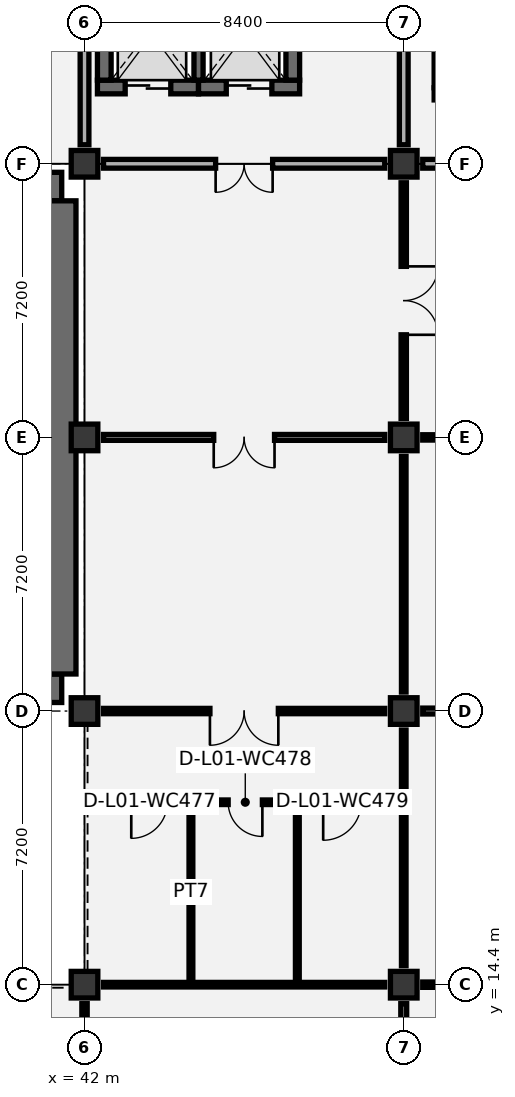
"""IFC4 building model, lengths in metres.
Left out: names, types, materials, properties, quantities, classifications, styles, units other than length and angle.
Written with IfcOpenShell. Run it as: python <this file> out.ifc"""

import sys

from ifc_helpers import new_model, si_unit, direction, frame, frame_2d, origin, origin_2d, place, context, subcontext, project, spatial, rectangle, extrude, element, fill, save


model = new_model("IFC4")
c1 = context("Model", 3, precision=1e-05, world=origin(), true_north=direction((0.0, 1.0)))
c2 = subcontext(c1, "Body", "Model", "MODEL_VIEW")
j1 = project(units=[si_unit("LENGTHUNIT", "METRE"), si_unit("PLANEANGLEUNIT", "RADIAN")], contexts=[c1])
p1 = place(None, origin())
s1 = spatial("IfcSite", under=j1, at=p1, CompositionType="ELEMENT")
p2 = place(p1, origin())
s2 = spatial("IfcBuilding", under=s1, at=p2, CompositionType="ELEMENT")
p3 = place(p2, frame((0.0, 0.0, 6.0)))
s3 = spatial("IfcBuildingStorey", under=s2, at=p3, CompositionType="ELEMENT", Elevation=6.0)
for number, where, z_axis, x_axis in (
    (1, (42.0, 14.4, 0.0), (0.0, 0.0, 1.0), (1.0, 0.0, 0.0)),
    (2, (42.0, 21.6, 0.0), (0.0, 0.0, 1.0), (1.0, 0.0, 0.0)),
    (3, (42.0, 28.8, 0.0), (0.0, 0.0, 1.0), (1.0, 0.0, 0.0)),
    (4, (42.0, 36.0, 0.0), (0.0, 0.0, 1.0), (1.0, 0.0, 0.0)),
    (5, (50.4, 14.4, 0.0), (0.0, 0.0, 1.0), (1.0, 0.0, 0.0)),
    (6, (50.4, 21.6, 0.0), (0.0, 0.0, 1.0), (1.0, 0.0, 0.0)),
    (7, (50.4, 28.8, 0.0), (0.0, 0.0, 1.0), (1.0, 0.0, 0.0)),
    (8, (50.4, 36.0, 0.0), (0.0, 0.0, 1.0), (1.0, 0.0, 0.0)),
):
    element("IfcColumn", number, at=place(p3, frame(where, z_axis=z_axis, x_axis=x_axis)), inside=s3, PredefinedType="COLUMN", context=c2, shape_type="SweptSolid", body=[
        extrude(rectangle(XDim=0.7, YDim=0.7, at=origin_2d()), origin(), (0.0, 0.0, 1.0), 5.4),
    ])
for number, where, z_axis, x_axis in (
    (9, (17.4, 22.2, 0.0), (0.0, 0.0, 1.0), (1.0, 0.0, 0.0)),
    (10, (17.4, 35.4, 0.0), (0.0, 0.0, 1.0), (1.0, 0.0, 0.0)),
):
    element("IfcWall", number, at=place(p3, frame(where, z_axis=z_axis, x_axis=x_axis)), inside=s3, PredefinedType="SOLIDWALL", context=c2, shape_type="SweptSolid", body=[
        extrude(rectangle(XDim=24.0, YDim=0.75, at=frame_2d((12.0, 0.0))), origin(), (0.0, 0.0, 1.0), 3.6),
    ])
p4 = place(p3, frame((41.4, 22.575, 0.0), z_axis=(0.0, 0.0, 1.0), x_axis=(0.0, 1.0, 0.0)))
e11 = element("IfcWall", 11, at=p4, inside=s3, PredefinedType="SOLIDWALL", context=c2, shape_type="SweptSolid", body=[
    extrude(rectangle(XDim=12.45, YDim=0.75, at=frame_2d((6.225, 0.0))), origin(), (0.0, 0.0, 1.0), 3.6),
])
p5 = place(p3, frame((51.2, 37.84, 0.0), z_axis=(0.0, 0.0, 1.0), x_axis=(1.0, 0.0, 0.0)))
e12 = element("IfcWall", 12, at=p5, inside=s3, PredefinedType="SHEAR", context=c2, shape_type="SweptSolid", body=[
    extrude(rectangle(XDim=7.48, YDim=0.32, at=frame_2d((3.74, 0.0))), origin(), (0.0, 0.0, 1.0), 5.075),
])
p6 = place(p5, frame((0.45, 0.0, 0.0)))
e13 = element("IfcOpeningElement", 13, at=p6, cuts=e12, PredefinedType="OPENING", context=c2, shape_type="SweptSolid", body=[
    extrude(rectangle(XDim=1.05, YDim=2.15, at=frame_2d((0.525, 1.075))), frame((0.0, 0.17, 0.0), z_axis=(0.0, -1.0, 0.0), x_axis=(1.0, 0.0, 0.0)), (0.0, 0.0, 1.0), 0.34),
])
p7 = place(p3, frame((51.36, 38.0, 0.0), z_axis=(0.0, 0.0, 1.0), x_axis=(0.0, 1.0, 0.0)))
e14 = element("IfcWall", 14, at=p7, inside=s3, PredefinedType="SHEAR", context=c2, shape_type="SweptSolid", body=[
    extrude(rectangle(XDim=3.8, YDim=0.32, at=frame_2d((1.9, 0.0))), origin(), (0.0, 0.0, 1.0), 5.075),
])
p8 = place(p3, frame((42.34, 38.02, 0.0), z_axis=(0.0, 0.0, 1.0), x_axis=(1.0, 0.0, 0.0)))
e15 = element("IfcWall", 15, at=p8, inside=s3, PredefinedType="SHEAR", context=c2, shape_type="SweptSolid", body=[
    extrude(rectangle(XDim=2.66, YDim=0.36, at=frame_2d((1.33, 0.0))), origin(), (0.0, 0.0, 1.0), 5.075),
])
p9 = place(p8, frame((0.73, 0.0, 0.0)))
e16 = element("IfcOpeningElement", 16, at=p9, cuts=e15, PredefinedType="OPENING", context=c2, shape_type="SweptSolid", body=[
    extrude(rectangle(XDim=1.2, YDim=2.15, at=frame_2d((0.6, 1.075))), frame((0.0, 0.19, 0.0), z_axis=(0.0, -1.0, 0.0), x_axis=(1.0, 0.0, 0.0)), (0.0, 0.0, 1.0), 0.38),
])
p10 = place(p3, frame((45.0, 38.02, 0.0), z_axis=(0.0, 0.0, 1.0), x_axis=(1.0, 0.0, 0.0)))
e17 = element("IfcWall", 17, at=p10, inside=s3, PredefinedType="SHEAR", context=c2, shape_type="SweptSolid", body=[
    extrude(rectangle(XDim=2.66, YDim=0.36, at=frame_2d((1.33, 0.0))), origin(), (0.0, 0.0, 1.0), 5.075),
])
p11 = place(p10, frame((0.73, 0.0, 0.0)))
e18 = element("IfcOpeningElement", 18, at=p11, cuts=e17, PredefinedType="OPENING", context=c2, shape_type="SweptSolid", body=[
    extrude(rectangle(XDim=1.2, YDim=2.15, at=frame_2d((0.6, 1.075))), frame((0.0, 0.19, 0.0), z_axis=(0.0, -1.0, 0.0), x_axis=(1.0, 0.0, 0.0)), (0.0, 0.0, 1.0), 0.38),
])
for number, where, z_axis, x_axis in (
    (19, (42.52, 38.2, 0.0), (0.0, 0.0, 1.0), (0.0, 1.0, 0.0)),
    (20, (47.48, 38.2, 0.0), (0.0, 0.0, 1.0), (0.0, 1.0, 0.0)),
):
    element("IfcWall", number, at=place(p3, frame(where, z_axis=z_axis, x_axis=x_axis)), inside=s3, PredefinedType="SHEAR", context=c2, shape_type="SweptSolid", body=[
        extrude(rectangle(XDim=2.8, YDim=0.36, at=frame_2d((1.4, 0.0))), origin(), (0.0, 0.0, 1.0), 5.075),
    ])
p12 = place(p3, frame((45.0, 38.2, 0.0), z_axis=(0.0, 0.0, 1.0), x_axis=(0.0, 1.0, 0.0)))
e21 = element("IfcWall", 21, at=p12, inside=s3, PredefinedType="SHEAR", context=c2, shape_type="SweptSolid", body=[
    extrude(rectangle(XDim=2.8, YDim=0.24, at=frame_2d((1.4, 0.0))), origin(), (0.0, 0.0, 1.0), 5.075),
])
p13 = place(p3, frame((42.15, 19.2, 0.0), z_axis=(0.0, 0.0, 1.0), x_axis=(1.0, 0.0, 0.0)))
e22 = element("IfcWall", 22, at=p13, inside=s3, PredefinedType="PARTITIONING", context=c2, shape_type="SweptSolid", body=[
    extrude(rectangle(XDim=8.1, YDim=0.12, at=frame_2d((4.05, 0.0))), origin(), (0.0, 0.0, 1.0), 5.075),
])
p14 = place(p13, frame((1.08, 0.0, 0.0)))
e23 = element("IfcOpeningElement", 23, at=p14, cuts=e22, PredefinedType="OPENING", context=c2, shape_type="SweptSolid", body=[
    extrude(rectangle(XDim=0.95, YDim=2.1, at=frame_2d((0.475, 1.05))), frame((0.0, 0.07, 0.0), z_axis=(0.0, -1.0, 0.0), x_axis=(1.0, 0.0, 0.0)), (0.0, 0.0, 1.0), 0.14),
])
p15 = place(p13, frame((3.63, 0.0, 0.0)))
e24 = element("IfcOpeningElement", 24, at=p15, cuts=e22, PredefinedType="OPENING", context=c2, shape_type="SweptSolid", body=[
    extrude(rectangle(XDim=0.9, YDim=2.1, at=frame_2d((0.45, 1.05))), frame((0.0, 0.07, 0.0), z_axis=(0.0, -1.0, 0.0), x_axis=(1.0, 0.0, 0.0)), (0.0, 0.0, 1.0), 0.14),
])
p16 = place(p13, frame((6.13, 0.0, 0.0)))
e25 = element("IfcOpeningElement", 25, at=p16, cuts=e22, PredefinedType="OPENING", context=c2, shape_type="SweptSolid", body=[
    extrude(rectangle(XDim=1.0, YDim=2.1, at=frame_2d((0.5, 1.05))), frame((0.0, 0.07, 0.0), z_axis=(0.0, -1.0, 0.0), x_axis=(1.0, 0.0, 0.0)), (0.0, 0.0, 1.0), 0.14),
])
for number, where, z_axis, x_axis in (
    (26, (44.8, 14.55, 0.0), (0.0, 0.0, 1.0), (0.0, 1.0, 0.0)),
    (27, (47.6, 14.55, 0.0), (0.0, 0.0, 1.0), (0.0, 1.0, 0.0)),
):
    element("IfcWall", number, at=place(p3, frame(where, z_axis=z_axis, x_axis=x_axis)), inside=s3, PredefinedType="PARTITIONING", context=c2, shape_type="SweptSolid", body=[
        extrude(rectangle(XDim=4.59, YDim=0.1, at=frame_2d((2.295, 0.0))), origin(), (0.0, 0.0, 1.0), 5.075),
    ])
p17 = place(p3, frame((42.0, 7.7, 0.0), z_axis=(0.0, 0.0, 1.0), x_axis=(0.0, 1.0, 0.0)))
e28 = element("IfcWall", 28, at=p17, inside=s3, PredefinedType="PARTITIONING", context=c2, shape_type="SweptSolid", body=[
    extrude(rectangle(XDim=6.2, YDim=0.14, at=frame_2d((3.1, 0.0))), origin(), (0.0, 0.0, 1.0), 4.32),
])
p18 = place(p17, frame((2.3, 0.0, 0.0)))
e29 = element("IfcOpeningElement", 29, at=p18, cuts=e28, PredefinedType="OPENING", context=c2, shape_type="SweptSolid", body=[
    extrude(rectangle(XDim=1.6, YDim=2.2, at=frame_2d((0.8, 1.1))), frame((0.0, 0.08, 0.0), z_axis=(0.0, -1.0, 0.0), x_axis=(1.0, 0.0, 0.0)), (0.0, 0.0, 1.0), 0.16),
])
p19 = place(p3, frame((42.0, 36.5, 0.0), z_axis=(0.0, 0.0, 1.0), x_axis=(0.0, 1.0, 0.0)))
e30 = element("IfcWall", 30, at=p19, inside=s3, PredefinedType="PARTITIONING", context=c2, shape_type="SweptSolid", body=[
    extrude(rectangle(XDim=6.2, YDim=0.23, at=frame_2d((3.1, 0.0))), origin(), (0.0, 0.0, 1.0), 4.42),
])
p20 = place(p3, frame((50.4, 7.7, 0.0), z_axis=(0.0, 0.0, 1.0), x_axis=(0.0, 1.0, 0.0)))
e31 = element("IfcWall", 31, at=p20, inside=s3, PredefinedType="PARTITIONING", context=c2, shape_type="SweptSolid", body=[
    extrude(rectangle(XDim=6.2, YDim=0.155, at=frame_2d((3.1, 0.0))), origin(), (0.0, 0.0, 1.0), 4.78),
])
p21 = place(p20, frame((2.3, 0.0, 0.0)))
e32 = element("IfcOpeningElement", 32, at=p21, cuts=e31, PredefinedType="OPENING", context=c2, shape_type="SweptSolid", body=[
    extrude(rectangle(XDim=1.6, YDim=2.2, at=frame_2d((0.8, 1.1))), frame((0.0, 0.087, 0.0), z_axis=(0.0, -1.0, 0.0), x_axis=(1.0, 0.0, 0.0)), (0.0, 0.0, 1.0), 0.175),
])
p22 = place(p3, frame((42.5, 14.4, 0.0), z_axis=(0.0, 0.0, 1.0), x_axis=(1.0, 0.0, 0.0)))
e33 = element("IfcWall", 33, at=p22, inside=s3, PredefinedType="PARTITIONING", context=c2, shape_type="SweptSolid", body=[
    extrude(rectangle(XDim=7.4, YDim=0.12, at=frame_2d((3.7, 0.0))), origin(), (0.0, 0.0, 1.0), 4.27),
])
p23 = place(p3, frame((50.4, 14.9, 0.0), z_axis=(0.0, 0.0, 1.0), x_axis=(0.0, 1.0, 0.0)))
e34 = element("IfcWall", 34, at=p23, inside=s3, PredefinedType="PARTITIONING", context=c2, shape_type="SweptSolid", body=[
    extrude(rectangle(XDim=6.2, YDim=0.12, at=frame_2d((3.1, 0.0))), origin(), (0.0, 0.0, 1.0), 4.32),
])
p24 = place(p3, frame((42.5, 21.6, 0.0), z_axis=(0.0, 0.0, 1.0), x_axis=(1.0, 0.0, 0.0)))
e35 = element("IfcWall", 35, at=p24, inside=s3, PredefinedType="PARTITIONING", context=c2, shape_type="SweptSolid", body=[
    extrude(rectangle(XDim=7.4, YDim=0.14, at=frame_2d((3.7, 0.0))), origin(), (0.0, 0.0, 1.0), 4.27),
])
p25 = place(p24, frame((2.8, 0.0, 0.0)))
e36 = element("IfcOpeningElement", 36, at=p25, cuts=e35, PredefinedType="OPENING", context=c2, shape_type="SweptSolid", body=[
    extrude(rectangle(XDim=1.8, YDim=2.25, at=frame_2d((0.9, 1.125))), frame((0.0, 0.08, 0.0), z_axis=(0.0, -1.0, 0.0), x_axis=(1.0, 0.0, 0.0)), (0.0, 0.0, 1.0), 0.16),
])
p26 = place(p3, frame((50.4, 22.1, 0.0), z_axis=(0.0, 0.0, 1.0), x_axis=(0.0, 1.0, 0.0)))
e37 = element("IfcWall", 37, at=p26, inside=s3, PredefinedType="PARTITIONING", context=c2, shape_type="SweptSolid", body=[
    extrude(rectangle(XDim=6.2, YDim=0.12, at=frame_2d((3.1, 0.0))), origin(), (0.0, 0.0, 1.0), 4.57),
])
p27 = place(p3, frame((42.5, 28.8, 0.0), z_axis=(0.0, 0.0, 1.0), x_axis=(1.0, 0.0, 0.0)))
e38 = element("IfcWall", 38, at=p27, inside=s3, PredefinedType="PARTITIONING", context=c2, shape_type="SweptSolid", body=[
    extrude(rectangle(XDim=7.4, YDim=0.155, at=frame_2d((3.7, 0.0))), origin(), (0.0, 0.0, 1.0), 4.27),
])
p28 = place(p27, frame((2.9, 0.0, 0.0)))
e39 = element("IfcOpeningElement", 39, at=p28, cuts=e38, PredefinedType="OPENING", context=c2, shape_type="SweptSolid", body=[
    extrude(rectangle(XDim=1.6, YDim=2.2, at=frame_2d((0.8, 1.1))), frame((0.0, 0.087, 0.0), z_axis=(0.0, -1.0, 0.0), x_axis=(1.0, 0.0, 0.0)), (0.0, 0.0, 1.0), 0.175),
])
p29 = place(p3, frame((50.4, 29.3, 0.0), z_axis=(0.0, 0.0, 1.0), x_axis=(0.0, 1.0, 0.0)))
e40 = element("IfcWall", 40, at=p29, inside=s3, PredefinedType="PARTITIONING", context=c2, shape_type="SweptSolid", body=[
    extrude(rectangle(XDim=6.2, YDim=0.14, at=frame_2d((3.1, 0.0))), origin(), (0.0, 0.0, 1.0), 4.32),
])
p30 = place(p29, frame((2.2, 0.0, 0.0)))
e41 = element("IfcOpeningElement", 41, at=p30, cuts=e40, PredefinedType="OPENING", context=c2, shape_type="SweptSolid", body=[
    extrude(rectangle(XDim=1.8, YDim=2.25, at=frame_2d((0.9, 1.125))), frame((0.0, 0.08, 0.0), z_axis=(0.0, -1.0, 0.0), x_axis=(1.0, 0.0, 0.0)), (0.0, 0.0, 1.0), 0.16),
])
p31 = place(p3, frame((42.5, 36.0, 0.0), z_axis=(0.0, 0.0, 1.0), x_axis=(1.0, 0.0, 0.0)))
e42 = element("IfcWall", 42, at=p31, inside=s3, PredefinedType="PARTITIONING", context=c2, shape_type="SweptSolid", body=[
    extrude(rectangle(XDim=7.4, YDim=0.23, at=frame_2d((3.7, 0.0))), origin(), (0.0, 0.0, 1.0), 4.27),
])
p32 = place(p31, frame((2.95, 0.0, 0.0)))
e43 = element("IfcOpeningElement", 43, at=p32, cuts=e42, PredefinedType="OPENING", context=c2, shape_type="SweptSolid", body=[
    extrude(rectangle(XDim=1.5, YDim=2.15, at=frame_2d((0.75, 1.075))), frame((0.0, 0.125, 0.0), z_axis=(0.0, -1.0, 0.0), x_axis=(1.0, 0.0, 0.0)), (0.0, 0.0, 1.0), 0.25),
])
p33 = place(p3, frame((50.4, 36.5, 0.0), z_axis=(0.0, 0.0, 1.0), x_axis=(0.0, 1.0, 0.0)))
e44 = element("IfcWall", 44, at=p33, inside=s3, PredefinedType="PARTITIONING", context=c2, shape_type="SweptSolid", body=[
    extrude(rectangle(XDim=6.2, YDim=0.23, at=frame_2d((3.1, 0.0))), origin(), (0.0, 0.0, 1.0), 4.67),
])
p34 = place(p3, frame((50.9, 14.4, 0.0), z_axis=(0.0, 0.0, 1.0), x_axis=(1.0, 0.0, 0.0)))
e45 = element("IfcWall", 45, at=p34, inside=s3, PredefinedType="PARTITIONING", context=c2, shape_type="SweptSolid", body=[
    extrude(rectangle(XDim=7.4, YDim=0.14, at=frame_2d((3.7, 0.0))), origin(), (0.0, 0.0, 1.0), 4.27),
])
p35 = place(p34, frame((2.9, 0.0, 0.0)))
e46 = element("IfcOpeningElement", 46, at=p35, cuts=e45, PredefinedType="OPENING", context=c2, shape_type="SweptSolid", body=[
    extrude(rectangle(XDim=1.6, YDim=2.2, at=frame_2d((0.8, 1.1))), frame((0.0, 0.08, 0.0), z_axis=(0.0, -1.0, 0.0), x_axis=(1.0, 0.0, 0.0)), (0.0, 0.0, 1.0), 0.16),
])
p36 = place(p3, frame((50.9, 21.6, 0.0), z_axis=(0.0, 0.0, 1.0), x_axis=(1.0, 0.0, 0.0)))
e47 = element("IfcWall", 47, at=p36, inside=s3, PredefinedType="PARTITIONING", context=c2, shape_type="SweptSolid", body=[
    extrude(rectangle(XDim=7.4, YDim=0.155, at=frame_2d((3.7, 0.0))), origin(), (0.0, 0.0, 1.0), 4.27),
])
p37 = place(p36, frame((2.8, 0.0, 0.0)))
e48 = element("IfcOpeningElement", 48, at=p37, cuts=e47, PredefinedType="OPENING", context=c2, shape_type="SweptSolid", body=[
    extrude(rectangle(XDim=1.8, YDim=2.25, at=frame_2d((0.9, 1.125))), frame((0.0, 0.087, 0.0), z_axis=(0.0, -1.0, 0.0), x_axis=(1.0, 0.0, 0.0)), (0.0, 0.0, 1.0), 0.175),
])
p38 = place(p3, frame((50.9, 28.8, 0.0), z_axis=(0.0, 0.0, 1.0), x_axis=(1.0, 0.0, 0.0)))
e49 = element("IfcWall", 49, at=p38, inside=s3, PredefinedType="PARTITIONING", context=c2, shape_type="SweptSolid", body=[
    extrude(rectangle(XDim=7.4, YDim=0.14, at=frame_2d((3.7, 0.0))), origin(), (0.0, 0.0, 1.0), 4.27),
])
p39 = place(p38, frame((2.9, 0.0, 0.0)))
e50 = element("IfcOpeningElement", 50, at=p39, cuts=e49, PredefinedType="OPENING", context=c2, shape_type="SweptSolid", body=[
    extrude(rectangle(XDim=1.6, YDim=2.2, at=frame_2d((0.8, 1.1))), frame((0.0, 0.08, 0.0), z_axis=(0.0, -1.0, 0.0), x_axis=(1.0, 0.0, 0.0)), (0.0, 0.0, 1.0), 0.16),
])
p40 = place(p3, frame((50.9, 36.0, 0.0), z_axis=(0.0, 0.0, 1.0), x_axis=(1.0, 0.0, 0.0)))
e51 = element("IfcWall", 51, at=p40, inside=s3, PredefinedType="PARTITIONING", context=c2, shape_type="SweptSolid", body=[
    extrude(rectangle(XDim=7.4, YDim=0.23, at=frame_2d((3.7, 0.0))), origin(), (0.0, 0.0, 1.0), 4.27),
])
p41 = place(p40, frame((2.95, 0.0, 0.0)))
e52 = element("IfcOpeningElement", 52, at=p41, cuts=e51, PredefinedType="OPENING", context=c2, shape_type="SweptSolid", body=[
    extrude(rectangle(XDim=1.5, YDim=2.15, at=frame_2d((0.75, 1.075))), frame((0.0, 0.125, 0.0), z_axis=(0.0, -1.0, 0.0), x_axis=(1.0, 0.0, 0.0)), (0.0, 0.0, 1.0), 0.25),
])
p42 = place(p9, origin())
e53 = element("IfcDoor", 53, at=p42, inside=s3, OperationType="DOUBLE_DOOR_SLIDING", PredefinedType="DOOR", context=c2, shape_type="SweptSolid", body=[
    extrude(rectangle(XDim=1.2, YDim=2.15, at=frame_2d((0.6, 1.075))), frame((0.0, 0.025, 0.0), z_axis=(0.0, -1.0, 0.0), x_axis=(1.0, 0.0, 0.0)), (0.0, 0.0, 1.0), 0.05),
])
fill(e16, e53)
p43 = place(p11, origin())
e54 = element("IfcDoor", 54, at=p43, inside=s3, OperationType="DOUBLE_DOOR_SLIDING", PredefinedType="DOOR", context=c2, shape_type="SweptSolid", body=[
    extrude(rectangle(XDim=1.2, YDim=2.15, at=frame_2d((0.6, 1.075))), frame((0.0, 0.025, 0.0), z_axis=(0.0, -1.0, 0.0), x_axis=(1.0, 0.0, 0.0)), (0.0, 0.0, 1.0), 0.05),
])
fill(e18, e54)
p44 = place(p14, frame((0.95, 0.0, 0.0), z_axis=(0.0, 0.0, 1.0), x_axis=(-1.0, 0.0, 0.0)))
e55 = element("IfcDoor", 55, at=p44, inside=s3, OperationType="SINGLE_SWING_RIGHT", PredefinedType="DOOR", context=c2, shape_type="SweptSolid", body=[
    extrude(rectangle(XDim=0.95, YDim=2.1, at=frame_2d((0.475, 1.05))), frame((0.0, 0.025, 0.0), z_axis=(0.0, -1.0, 0.0), x_axis=(1.0, 0.0, 0.0)), (0.0, 0.0, 1.0), 0.05),
])
fill(e23, e55)
p45 = place(p15, frame((0.9, 0.0, 0.0), z_axis=(0.0, 0.0, 1.0), x_axis=(-1.0, 0.0, 0.0)))
e56 = element("IfcDoor", 56, at=p45, inside=s3, OperationType="SINGLE_SWING_LEFT", PredefinedType="DOOR", context=c2, shape_type="SweptSolid", body=[
    extrude(rectangle(XDim=0.9, YDim=2.1, at=frame_2d((0.45, 1.05))), frame((0.0, 0.025, 0.0), z_axis=(0.0, -1.0, 0.0), x_axis=(1.0, 0.0, 0.0)), (0.0, 0.0, 1.0), 0.05),
])
fill(e24, e56)
p46 = place(p16, frame((1.0, 0.0, 0.0), z_axis=(0.0, 0.0, 1.0), x_axis=(-1.0, 0.0, 0.0)))
e57 = element("IfcDoor", 57, at=p46, inside=s3, OperationType="SINGLE_SWING_RIGHT", PredefinedType="DOOR", context=c2, shape_type="SweptSolid", body=[
    extrude(rectangle(XDim=1.0, YDim=2.1, at=frame_2d((0.5, 1.05))), frame((0.0, 0.025, 0.0), z_axis=(0.0, -1.0, 0.0), x_axis=(1.0, 0.0, 0.0)), (0.0, 0.0, 1.0), 0.05),
])
fill(e25, e57)
p47 = place(p25, frame((1.8, 0.0, 0.0), z_axis=(0.0, 0.0, 1.0), x_axis=(-1.0, 0.0, 0.0)))
e58 = element("IfcDoor", 58, at=p47, inside=s3, OperationType="DOUBLE_DOOR_SINGLE_SWING", PredefinedType="DOOR", context=c2, shape_type="SweptSolid", body=[
    extrude(rectangle(XDim=1.8, YDim=2.25, at=frame_2d((0.9, 1.125))), frame((0.0, 0.025, 0.0), z_axis=(0.0, -1.0, 0.0), x_axis=(1.0, 0.0, 0.0)), (0.0, 0.0, 1.0), 0.05),
])
fill(e36, e58)
p48 = place(p28, frame((1.6, 0.0, 0.0), z_axis=(0.0, 0.0, 1.0), x_axis=(-1.0, 0.0, 0.0)))
e59 = element("IfcDoor", 59, at=p48, inside=s3, OperationType="DOUBLE_DOOR_SINGLE_SWING", PredefinedType="DOOR", context=c2, shape_type="SweptSolid", body=[
    extrude(rectangle(XDim=1.6, YDim=2.2, at=frame_2d((0.8, 1.1))), frame((0.0, 0.025, 0.0), z_axis=(0.0, -1.0, 0.0), x_axis=(1.0, 0.0, 0.0)), (0.0, 0.0, 1.0), 0.05),
])
fill(e39, e59)
p49 = place(p30, frame((1.8, 0.0, 0.0), z_axis=(0.0, 0.0, 1.0), x_axis=(-1.0, 0.0, 0.0)))
e60 = element("IfcDoor", 60, at=p49, inside=s3, OperationType="DOUBLE_DOOR_SINGLE_SWING", PredefinedType="DOOR", context=c2, shape_type="SweptSolid", body=[
    extrude(rectangle(XDim=1.8, YDim=2.25, at=frame_2d((0.9, 1.125))), frame((0.0, 0.025, 0.0), z_axis=(0.0, -1.0, 0.0), x_axis=(1.0, 0.0, 0.0)), (0.0, 0.0, 1.0), 0.05),
])
fill(e41, e60)
p50 = place(p32, frame((1.5, 0.0, 0.0), z_axis=(0.0, 0.0, 1.0), x_axis=(-1.0, 0.0, 0.0)))
e61 = element("IfcDoor", 61, at=p50, inside=s3, OperationType="DOUBLE_DOOR_SINGLE_SWING", PredefinedType="DOOR", context=c2, shape_type="SweptSolid", body=[
    extrude(rectangle(XDim=1.5, YDim=2.15, at=frame_2d((0.75, 1.075))), frame((0.0, 0.025, 0.0), z_axis=(0.0, -1.0, 0.0), x_axis=(1.0, 0.0, 0.0)), (0.0, 0.0, 1.0), 0.05),
])
fill(e43, e61)
save(model, sys.argv[1])
